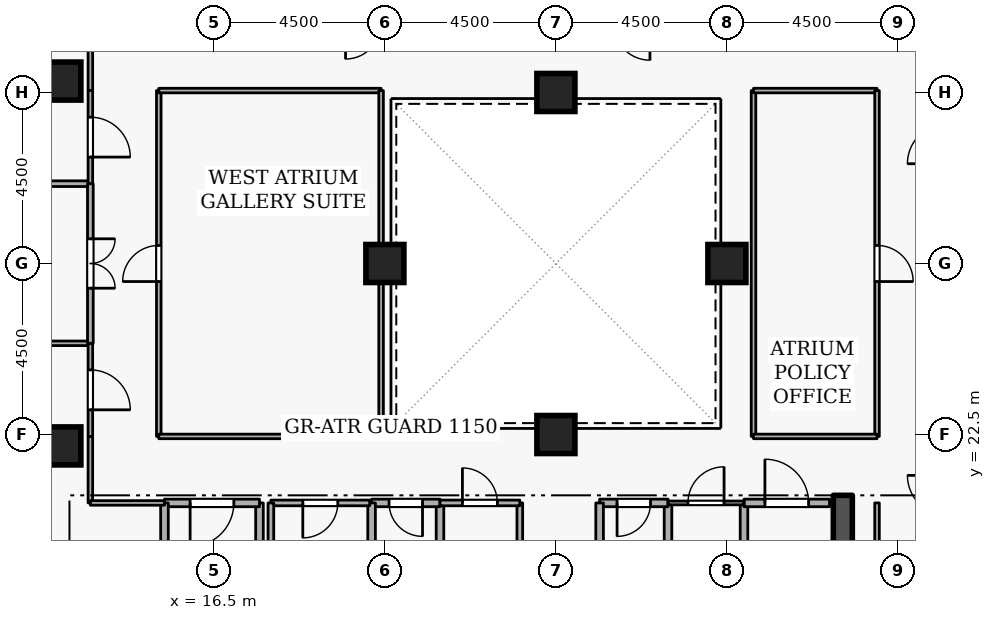
"""IFC4 building model, lengths in metres.
Left out: names, types, materials, properties, quantities, classifications, styles, units other than length and angle.
Written with IfcOpenShell. Run it as: python <this file> out.ifc"""

import sys

from ifc_helpers import new_model, si_unit, direction, frame, frame_2d, origin, origin_2d, place, context, subcontext, project, spatial, rectangle, extrude, element, fill, save


model = new_model("IFC4")
c1 = context("Model", 3, precision=1e-05, world=origin(), true_north=direction((0.0, 1.0)))
c2 = subcontext(c1, "Body", "Model", "MODEL_VIEW")
j1 = project(units=[si_unit("LENGTHUNIT", "METRE"), si_unit("PLANEANGLEUNIT", "RADIAN")], contexts=[c1])
p1 = place(None, origin())
s1 = spatial("IfcSite", under=j1, at=p1, CompositionType="ELEMENT")
p2 = place(p1, origin())
s2 = spatial("IfcBuilding", under=s1, at=p2, CompositionType="ELEMENT")
p3 = place(p2, frame((0.0, 0.0, 236.7)))
s3 = spatial("IfcBuildingStorey", under=s2, at=p3, CompositionType="ELEMENT", Elevation=236.7)
p4 = place(p3, frame((33.05, 15.1, 0.0), z_axis=(0.0, 0.0, 1.0), x_axis=(0.0, 1.0, 0.0)))
e1 = element("IfcWall", 1, at=p4, inside=s3, PredefinedType="SHEAR", context=c2, shape_type="SweptSolid", body=[
    extrude(rectangle(XDim=5.8, YDim=0.5, at=frame_2d((2.9, 0.0))), origin(), (0.0, 0.0, 1.0), 3.6),
])
for number, where, z_axis, x_axis in (
    (2, (12.5, 22.2, 0.0), (0.0, 0.0, 1.0), (1.0, 0.0, 0.0)),
    (3, (12.5, 31.8, 0.0), (0.0, 0.0, 1.0), (1.0, 0.0, 0.0)),
    (4, (25.5, 22.5, 0.0), (0.0, 0.0, 1.0), (1.0, 0.0, 0.0)),
    (5, (25.5, 31.5, 0.0), (0.0, 0.0, 1.0), (1.0, 0.0, 0.0)),
    (6, (21.0, 27.0, 0.0), (0.0, 0.0, 1.0), (1.0, 0.0, 0.0)),
    (7, (30.0, 27.0, 0.0), (0.0, 0.0, 1.0), (1.0, 0.0, 0.0)),
):
    element("IfcColumn", number, at=place(p3, frame(where, z_axis=z_axis, x_axis=x_axis)), inside=s3, PredefinedType="COLUMN", context=c2, shape_type="SweptSolid", body=[
        extrude(rectangle(XDim=1.0, YDim=1.0, at=origin_2d()), origin(), (0.0, 0.0, 1.0), 3.6),
    ])
p5 = place(p3, frame((17.7, 18.4, 0.0), z_axis=(0.0, 0.0, 1.0), x_axis=(0.0, 1.0, 0.0)))
e8 = element("IfcWall", 8, at=p5, inside=s3, PredefinedType="STANDARD", context=c2, shape_type="SweptSolid", body=[
    extrude(rectangle(XDim=2.3, YDim=0.2, at=frame_2d((1.15, 0.0))), origin(), (0.0, 0.0, 1.0), 2.545),
])
p6 = place(p3, frame((17.7, 20.7, 0.0), z_axis=(0.0, 0.0, 1.0), x_axis=(-1.0, 0.0, 0.0)))
e9 = element("IfcWall", 9, at=p6, inside=s3, PredefinedType="STANDARD", context=c2, shape_type="SweptSolid", body=[
    extrude(rectangle(XDim=2.5, YDim=0.2, at=frame_2d((1.25, 0.0))), origin(), (0.0, 0.0, 1.0), 3.34),
])
p7 = place(p6, frame((0.675, 0.0, 0.0)))
e10 = element("IfcOpeningElement", 10, at=p7, cuts=e9, PredefinedType="OPENING", context=c2, shape_type="SweptSolid", body=[
    extrude(rectangle(XDim=1.15, YDim=2.1, at=frame_2d((0.575, 1.05))), frame((0.0, 0.11, 0.0), z_axis=(0.0, -1.0, 0.0), x_axis=(1.0, 0.0, 0.0)), (0.0, 0.0, 1.0), 0.22),
])
p8 = place(p3, frame((15.2, 20.7, 0.0), z_axis=(0.0, 0.0, 1.0), x_axis=(0.0, -1.0, 0.0)))
e11 = element("IfcWall", 11, at=p8, inside=s3, PredefinedType="STANDARD", context=c2, shape_type="SweptSolid", body=[
    extrude(rectangle(XDim=5.7, YDim=0.2, at=frame_2d((2.85, 0.0))), origin(), (0.0, 0.0, 1.0), 3.34),
])
p9 = place(p3, frame((28.45, 18.65, 0.0), z_axis=(0.0, 0.0, 1.0), x_axis=(0.0, 1.0, 0.0)))
e12 = element("IfcWall", 12, at=p9, inside=s3, PredefinedType="STANDARD", context=c2, shape_type="SweptSolid", body=[
    extrude(rectangle(XDim=2.05, YDim=0.2, at=frame_2d((1.025, 0.0))), origin(), (0.0, 0.0, 1.0), 3.34),
])
p10 = place(p3, frame((28.45, 20.7, 0.0), z_axis=(0.0, 0.0, 1.0), x_axis=(-1.0, 0.0, 0.0)))
e13 = element("IfcWall", 13, at=p10, inside=s3, PredefinedType="STANDARD", context=c2, shape_type="SweptSolid", body=[
    extrude(rectangle(XDim=1.8, YDim=0.2, at=frame_2d((0.9, 0.0))), origin(), (0.0, 0.0, 1.0), 3.34),
])
p11 = place(p10, frame((0.46, 0.0, 0.0)))
e14 = element("IfcOpeningElement", 14, at=p11, cuts=e13, PredefinedType="OPENING", context=c2, shape_type="SweptSolid", body=[
    extrude(rectangle(XDim=0.88, YDim=2.04, at=frame_2d((0.44, 1.02))), frame((0.0, 0.11, 0.0), z_axis=(0.0, -1.0, 0.0), x_axis=(1.0, 0.0, 0.0)), (0.0, 0.0, 1.0), 0.22),
])
for number, where, z_axis, x_axis in (
    (15, (26.65, 20.7, 0.0), (0.0, 0.0, 1.0), (0.0, -1.0, 0.0)),
    (16, (22.45, 18.65, 0.0), (0.0, 0.0, 1.0), (0.0, 1.0, 0.0)),
):
    element("IfcWall", number, at=place(p3, frame(where, z_axis=z_axis, x_axis=x_axis)), inside=s3, PredefinedType="STANDARD", context=c2, shape_type="SweptSolid", body=[
        extrude(rectangle(XDim=2.05, YDim=0.2, at=frame_2d((1.025, 0.0))), origin(), (0.0, 0.0, 1.0), 3.34),
    ])
p12 = place(p3, frame((22.45, 20.7, 0.0), z_axis=(0.0, 0.0, 1.0), x_axis=(-1.0, 0.0, 0.0)))
e17 = element("IfcWall", 17, at=p12, inside=s3, PredefinedType="STANDARD", context=c2, shape_type="SweptSolid", body=[
    extrude(rectangle(XDim=1.8, YDim=0.2, at=frame_2d((0.9, 0.0))), origin(), (0.0, 0.0, 1.0), 3.34),
])
p13 = place(p12, frame((0.46, 0.0, 0.0)))
e18 = element("IfcOpeningElement", 18, at=p13, cuts=e17, PredefinedType="OPENING", context=c2, shape_type="SweptSolid", body=[
    extrude(rectangle(XDim=0.88, YDim=2.04, at=frame_2d((0.44, 1.02))), frame((0.0, 0.11, 0.0), z_axis=(0.0, -1.0, 0.0), x_axis=(1.0, 0.0, 0.0)), (0.0, 0.0, 1.0), 0.22),
])
for number, where, z_axis, x_axis in (
    (19, (20.65, 20.7, 0.0), (0.0, 0.0, 1.0), (0.0, -1.0, 0.0)),
    (20, (30.45, 18.65, 0.0), (0.0, 0.0, 1.0), (0.0, 1.0, 0.0)),
):
    element("IfcWall", number, at=place(p3, frame(where, z_axis=z_axis, x_axis=x_axis)), inside=s3, PredefinedType="STANDARD", context=c2, shape_type="SweptSolid", body=[
        extrude(rectangle(XDim=2.05, YDim=0.2, at=frame_2d((1.025, 0.0))), origin(), (0.0, 0.0, 1.0), 3.34),
    ])
p14 = place(p3, frame((30.45, 20.7, 0.0), z_axis=(0.0, 0.0, 1.0), x_axis=(1.0, 0.0, 0.0)))
e21 = element("IfcWall", 21, at=p14, inside=s3, PredefinedType="STANDARD", context=c2, shape_type="SweptSolid", body=[
    extrude(rectangle(XDim=2.25, YDim=0.2, at=frame_2d((1.125, 0.0))), origin(), (0.0, 0.0, 1.0), 3.34),
])
p15 = place(p14, frame((0.55, 0.0, 0.0)))
e22 = element("IfcOpeningElement", 22, at=p15, cuts=e21, PredefinedType="OPENING", context=c2, shape_type="SweptSolid", body=[
    extrude(rectangle(XDim=1.15, YDim=2.1, at=frame_2d((0.575, 1.05))), frame((0.0, 0.11, 0.0), z_axis=(0.0, -1.0, 0.0), x_axis=(1.0, 0.0, 0.0)), (0.0, 0.0, 1.0), 0.22),
])
p16 = place(p3, frame((20.6, 20.7, 0.0), z_axis=(0.0, 0.0, 1.0), x_axis=(-1.0, 0.0, 0.0)))
e23 = element("IfcWall", 23, at=p16, inside=s3, PredefinedType="PARTITIONING", context=c2, shape_type="SweptSolid", body=[
    extrude(rectangle(XDim=2.6, YDim=0.15, at=frame_2d((1.3, 0.0))), origin(), (0.0, 0.0, 1.0), 3.34),
])
p17 = place(p16, frame((0.84, 0.0, 0.0)))
e24 = element("IfcOpeningElement", 24, at=p17, cuts=e23, PredefinedType="OPENING", context=c2, shape_type="SweptSolid", body=[
    extrude(rectangle(XDim=0.92, YDim=2.08, at=frame_2d((0.46, 1.04))), frame((0.0, 0.085, 0.0), z_axis=(0.0, -1.0, 0.0), x_axis=(1.0, 0.0, 0.0)), (0.0, 0.0, 1.0), 0.17),
])
p18 = place(p3, frame((18.0, 20.7, 0.0), z_axis=(0.0, 0.0, 1.0), x_axis=(0.0, -1.0, 0.0)))
e25 = element("IfcWall", 25, at=p18, inside=s3, PredefinedType="PARTITIONING", context=c2, shape_type="SweptSolid", body=[
    extrude(rectangle(XDim=2.05, YDim=0.15, at=frame_2d((1.025, 0.0))), origin(), (0.0, 0.0, 1.0), 2.545),
])
p19 = place(p3, frame((24.55, 20.7, 0.0), z_axis=(0.0, 0.0, 1.0), x_axis=(0.0, -1.0, 0.0)))
e26 = element("IfcWall", 26, at=p19, inside=s3, PredefinedType="PARTITIONING", context=c2, shape_type="SweptSolid", body=[
    extrude(rectangle(XDim=2.05, YDim=0.15, at=frame_2d((1.025, 0.0))), origin(), (0.0, 0.0, 1.0), 3.34),
])
p20 = place(p3, frame((22.45, 20.7, 0.0), z_axis=(0.0, 0.0, 1.0), x_axis=(1.0, 0.0, 0.0)))
e27 = element("IfcWall", 27, at=p20, inside=s3, PredefinedType="PARTITIONING", context=c2, shape_type="SweptSolid", body=[
    extrude(rectangle(XDim=2.1, YDim=0.15, at=frame_2d((1.05, 0.0))), origin(), (0.0, 0.0, 1.0), 3.34),
])
p21 = place(p20, frame((0.59, 0.0, 0.0)))
e28 = element("IfcOpeningElement", 28, at=p21, cuts=e27, PredefinedType="OPENING", context=c2, shape_type="SweptSolid", body=[
    extrude(rectangle(XDim=0.92, YDim=2.08, at=frame_2d((0.46, 1.04))), frame((0.0, 0.085, 0.0), z_axis=(0.0, -1.0, 0.0), x_axis=(1.0, 0.0, 0.0)), (0.0, 0.0, 1.0), 0.17),
])
p22 = place(p3, frame((28.45, 20.7, 0.0), z_axis=(0.0, 0.0, 1.0), x_axis=(1.0, 0.0, 0.0)))
e29 = element("IfcWall", 29, at=p22, inside=s3, PredefinedType="PARTITIONING", context=c2, shape_type="SweptSolid", body=[
    extrude(rectangle(XDim=2.0, YDim=0.1, at=frame_2d((1.0, 0.0))), origin(), (0.0, 0.0, 1.0), 3.34),
])
p23 = place(p22, frame((0.525, 0.0, 0.0)))
e30 = element("IfcOpeningElement", 30, at=p23, cuts=e29, PredefinedType="OPENING", context=c2, shape_type="SweptSolid", body=[
    extrude(rectangle(XDim=0.95, YDim=2.1, at=frame_2d((0.475, 1.05))), frame((0.0, 0.06, 0.0), z_axis=(0.0, -1.0, 0.0), x_axis=(1.0, 0.0, 0.0)), (0.0, 0.0, 1.0), 0.12),
])
p24 = place(p3, frame((33.95, 20.7, 0.0), z_axis=(0.0, 0.0, 1.0), x_axis=(0.0, -1.0, 0.0)))
e31 = element("IfcWall", 31, at=p24, inside=s3, PredefinedType="PARTITIONING", context=c2, shape_type="SweptSolid", body=[
    extrude(rectangle(XDim=5.9, YDim=0.12, at=frame_2d((2.95, 0.0))), origin(), (0.0, 0.0, 1.0), 3.34),
])
p25 = place(p3, frame((13.25, 22.45, 0.0), z_axis=(0.0, 0.0, 1.0), x_axis=(0.0, -1.0, 0.0)))
e32 = element("IfcWall", 32, at=p25, inside=s3, PredefinedType="PARTITIONING", context=c2, shape_type="SweptSolid", body=[
    extrude(rectangle(XDim=1.75, YDim=0.12, at=frame_2d((0.875, 0.0))), origin(), (0.0, 0.0, 1.0), 3.34),
])
p26 = place(p3, frame((13.25, 20.7, 0.0), z_axis=(0.0, 0.0, 1.0), x_axis=(1.0, 0.0, 0.0)))
e33 = element("IfcWall", 33, at=p26, inside=s3, PredefinedType="PARTITIONING", context=c2, shape_type="SweptSolid", body=[
    extrude(rectangle(XDim=1.95, YDim=0.12, at=frame_2d((0.975, 0.0))), origin(), (0.0, 0.0, 1.0), 3.34),
])
p27 = place(p3, frame((1.78, 24.9, 0.0), z_axis=(0.0, 0.0, 1.0), x_axis=(1.0, 0.0, 0.0)))
e34 = element("IfcWall", 34, at=p27, inside=s3, PredefinedType="PARTITIONING", context=c2, shape_type="SweptSolid", body=[
    extrude(rectangle(XDim=11.47, YDim=0.12, at=frame_2d((5.735, 0.0))), origin(), (0.0, 0.0, 1.0), 3.34),
])
p28 = place(p3, frame((13.25, 24.9, 0.0), z_axis=(0.0, 0.0, 1.0), x_axis=(0.0, -1.0, 0.0)))
e35 = element("IfcWall", 35, at=p28, inside=s3, PredefinedType="PARTITIONING", context=c2, shape_type="SweptSolid", body=[
    extrude(rectangle(XDim=2.45, YDim=0.12, at=frame_2d((1.225, 0.0))), origin(), (0.0, 0.0, 1.0), 3.34),
])
p29 = place(p28, frame((0.7, 0.0, 0.0)))
e36 = element("IfcOpeningElement", 36, at=p29, cuts=e35, PredefinedType="OPENING", context=c2, shape_type="SweptSolid", body=[
    extrude(rectangle(XDim=1.05, YDim=2.1, at=frame_2d((0.525, 1.05))), frame((0.0, 0.07, 0.0), z_axis=(0.0, -1.0, 0.0), x_axis=(1.0, 0.0, 0.0)), (0.0, 0.0, 1.0), 0.14),
])
p30 = place(p3, frame((1.78, 29.1, 0.0), z_axis=(0.0, 0.0, 1.0), x_axis=(1.0, 0.0, 0.0)))
e37 = element("IfcWall", 37, at=p30, inside=s3, PredefinedType="PARTITIONING", context=c2, shape_type="SweptSolid", body=[
    extrude(rectangle(XDim=11.47, YDim=0.15, at=frame_2d((5.735, 0.0))), origin(), (0.0, 0.0, 1.0), 3.34),
])
p31 = place(p3, frame((13.25, 29.1, 0.0), z_axis=(0.0, 0.0, 1.0), x_axis=(0.0, -1.0, 0.0)))
e38 = element("IfcWall", 38, at=p31, inside=s3, PredefinedType="PARTITIONING", context=c2, shape_type="SweptSolid", body=[
    extrude(rectangle(XDim=4.2, YDim=0.15, at=frame_2d((2.1, 0.0))), origin(), (0.0, 0.0, 1.0), 3.34),
])
p32 = place(p31, frame((1.45, 0.0, 0.0)))
e39 = element("IfcOpeningElement", 39, at=p32, cuts=e38, PredefinedType="OPENING", context=c2, shape_type="SweptSolid", body=[
    extrude(rectangle(XDim=1.3, YDim=2.12, at=frame_2d((0.65, 1.06))), frame((0.0, 0.085, 0.0), z_axis=(0.0, -1.0, 0.0), x_axis=(1.0, 0.0, 0.0)), (0.0, 0.0, 1.0), 0.17),
])
p33 = place(p3, frame((13.25, 33.3, 0.0), z_axis=(0.0, 0.0, 1.0), x_axis=(0.0, -1.0, 0.0)))
e40 = element("IfcWall", 40, at=p33, inside=s3, PredefinedType="PARTITIONING", context=c2, shape_type="SweptSolid", body=[
    extrude(rectangle(XDim=1.75, YDim=0.12, at=frame_2d((0.875, 0.0))), origin(), (0.0, 0.0, 1.0), 3.34),
])
p34 = place(p3, frame((13.25, 31.55, 0.0), z_axis=(0.0, 0.0, 1.0), x_axis=(0.0, -1.0, 0.0)))
e41 = element("IfcWall", 41, at=p34, inside=s3, PredefinedType="PARTITIONING", context=c2, shape_type="SweptSolid", body=[
    extrude(rectangle(XDim=2.45, YDim=0.12, at=frame_2d((1.225, 0.0))), origin(), (0.0, 0.0, 1.0), 3.34),
])
p35 = place(p34, frame((0.7, 0.0, 0.0)))
e42 = element("IfcOpeningElement", 42, at=p35, cuts=e41, PredefinedType="OPENING", context=c2, shape_type="SweptSolid", body=[
    extrude(rectangle(XDim=1.05, YDim=2.1, at=frame_2d((0.525, 1.05))), frame((0.0, 0.07, 0.0), z_axis=(0.0, -1.0, 0.0), x_axis=(1.0, 0.0, 0.0)), (0.0, 0.0, 1.0), 0.14),
])
p36 = place(p3, frame((15.05, 22.45, 0.0), z_axis=(0.0, 0.0, 1.0), x_axis=(0.0, 1.0, 0.0)))
e43 = element("IfcWall", 43, at=p36, inside=s3, PredefinedType="PARTITIONING", context=c2, shape_type="SweptSolid", body=[
    extrude(rectangle(XDim=9.1, YDim=0.12, at=frame_2d((4.55, 0.0))), origin(), (0.0, 0.0, 1.0), 3.34),
])
p37 = place(p36, frame((4.075, 0.0, 0.0)))
e44 = element("IfcOpeningElement", 44, at=p37, cuts=e43, PredefinedType="OPENING", context=c2, shape_type="SweptSolid", body=[
    extrude(rectangle(XDim=0.95, YDim=2.1, at=frame_2d((0.475, 1.05))), frame((0.0, 0.07, 0.0), z_axis=(0.0, -1.0, 0.0), x_axis=(1.0, 0.0, 0.0)), (0.0, 0.0, 1.0), 0.14),
])
p38 = place(p3, frame((15.05, 31.55, 0.0), z_axis=(0.0, 0.0, 1.0), x_axis=(1.0, 0.0, 0.0)))
e45 = element("IfcWall", 45, at=p38, inside=s3, PredefinedType="PARTITIONING", context=c2, shape_type="SweptSolid", body=[
    extrude(rectangle(XDim=5.85, YDim=0.12, at=frame_2d((2.925, 0.0))), origin(), (0.0, 0.0, 1.0), 3.34),
])
p39 = place(p3, frame((20.9, 31.55, 0.0), z_axis=(0.0, 0.0, 1.0), x_axis=(0.0, -1.0, 0.0)))
e46 = element("IfcWall", 46, at=p39, inside=s3, PredefinedType="PARTITIONING", context=c2, shape_type="SweptSolid", body=[
    extrude(rectangle(XDim=9.1, YDim=0.12, at=frame_2d((4.55, 0.0))), origin(), (0.0, 0.0, 1.0), 3.34),
])
p40 = place(p3, frame((20.9, 22.45, 0.0), z_axis=(0.0, 0.0, 1.0), x_axis=(-1.0, 0.0, 0.0)))
e47 = element("IfcWall", 47, at=p40, inside=s3, PredefinedType="PARTITIONING", context=c2, shape_type="SweptSolid", body=[
    extrude(rectangle(XDim=5.85, YDim=0.12, at=frame_2d((2.925, 0.0))), origin(), (0.0, 0.0, 1.0), 3.34),
])
p41 = place(p3, frame((30.7, 22.45, 0.0), z_axis=(0.0, 0.0, 1.0), x_axis=(0.0, 1.0, 0.0)))
e48 = element("IfcWall", 48, at=p41, inside=s3, PredefinedType="PARTITIONING", context=c2, shape_type="SweptSolid", body=[
    extrude(rectangle(XDim=9.1, YDim=0.12, at=frame_2d((4.55, 0.0))), origin(), (0.0, 0.0, 1.0), 3.34),
])
p42 = place(p3, frame((30.7, 31.55, 0.0), z_axis=(0.0, 0.0, 1.0), x_axis=(1.0, 0.0, 0.0)))
e49 = element("IfcWall", 49, at=p42, inside=s3, PredefinedType="PARTITIONING", context=c2, shape_type="SweptSolid", body=[
    extrude(rectangle(XDim=3.25, YDim=0.12, at=frame_2d((1.625, 0.0))), origin(), (0.0, 0.0, 1.0), 3.34),
])
p43 = place(p3, frame((33.95, 31.55, 0.0), z_axis=(0.0, 0.0, 1.0), x_axis=(0.0, -1.0, 0.0)))
e50 = element("IfcWall", 50, at=p43, inside=s3, PredefinedType="PARTITIONING", context=c2, shape_type="SweptSolid", body=[
    extrude(rectangle(XDim=9.1, YDim=0.12, at=frame_2d((4.55, 0.0))), origin(), (0.0, 0.0, 1.0), 3.34),
])
p44 = place(p43, frame((4.075, 0.0, 0.0)))
e51 = element("IfcOpeningElement", 51, at=p44, cuts=e50, PredefinedType="OPENING", context=c2, shape_type="SweptSolid", body=[
    extrude(rectangle(XDim=0.95, YDim=2.1, at=frame_2d((0.475, 1.05))), frame((0.0, 0.07, 0.0), z_axis=(0.0, -1.0, 0.0), x_axis=(1.0, 0.0, 0.0)), (0.0, 0.0, 1.0), 0.14),
])
p45 = place(p3, frame((33.95, 22.45, 0.0), z_axis=(0.0, 0.0, 1.0), x_axis=(-1.0, 0.0, 0.0)))
e52 = element("IfcWall", 52, at=p45, inside=s3, PredefinedType="PARTITIONING", context=c2, shape_type="SweptSolid", body=[
    extrude(rectangle(XDim=3.25, YDim=0.12, at=frame_2d((1.625, 0.0))), origin(), (0.0, 0.0, 1.0), 3.34),
])
p46 = place(p7, origin())
e53 = element("IfcDoor", 53, at=p46, inside=s3, OperationType="SINGLE_SWING_RIGHT", PredefinedType="DOOR", context=c2, shape_type="SweptSolid", body=[
    extrude(rectangle(XDim=1.15, YDim=2.1, at=frame_2d((0.575, 1.05))), frame((0.0, 0.025, 0.0), z_axis=(0.0, -1.0, 0.0), x_axis=(1.0, 0.0, 0.0)), (0.0, 0.0, 1.0), 0.05),
])
fill(e10, e53)
p47 = place(p11, origin())
e54 = element("IfcDoor", 54, at=p47, inside=s3, OperationType="SINGLE_SWING_RIGHT", PredefinedType="DOOR", context=c2, shape_type="SweptSolid", body=[
    extrude(rectangle(XDim=0.88, YDim=2.04, at=frame_2d((0.44, 1.02))), frame((0.0, 0.025, 0.0), z_axis=(0.0, -1.0, 0.0), x_axis=(1.0, 0.0, 0.0)), (0.0, 0.0, 1.0), 0.05),
])
fill(e14, e54)
p48 = place(p13, origin())
e55 = element("IfcDoor", 55, at=p48, inside=s3, OperationType="SINGLE_SWING_LEFT", PredefinedType="DOOR", context=c2, shape_type="SweptSolid", body=[
    extrude(rectangle(XDim=0.88, YDim=2.04, at=frame_2d((0.44, 1.02))), frame((0.0, 0.025, 0.0), z_axis=(0.0, -1.0, 0.0), x_axis=(1.0, 0.0, 0.0)), (0.0, 0.0, 1.0), 0.05),
])
fill(e18, e55)
p49 = place(p17, origin())
e56 = element("IfcDoor", 56, at=p49, inside=s3, OperationType="SINGLE_SWING_RIGHT", PredefinedType="DOOR", context=c2, shape_type="SweptSolid", body=[
    extrude(rectangle(XDim=0.92, YDim=2.08, at=frame_2d((0.46, 1.04))), frame((0.0, 0.025, 0.0), z_axis=(0.0, -1.0, 0.0), x_axis=(1.0, 0.0, 0.0)), (0.0, 0.0, 1.0), 0.05),
])
fill(e24, e56)
p50 = place(p21, origin())
e57 = element("IfcDoor", 57, at=p50, inside=s3, OperationType="SINGLE_SWING_LEFT", PredefinedType="DOOR", context=c2, shape_type="SweptSolid", body=[
    extrude(rectangle(XDim=0.92, YDim=2.08, at=frame_2d((0.46, 1.04))), frame((0.0, 0.025, 0.0), z_axis=(0.0, -1.0, 0.0), x_axis=(1.0, 0.0, 0.0)), (0.0, 0.0, 1.0), 0.05),
])
fill(e28, e57)
p51 = place(p23, origin())
e58 = element("IfcDoor", 58, at=p51, inside=s3, OperationType="SINGLE_SWING_RIGHT", PredefinedType="DOOR", context=c2, shape_type="SweptSolid", body=[
    extrude(rectangle(XDim=0.95, YDim=2.1, at=frame_2d((0.475, 1.05))), frame((0.0, 0.025, 0.0), z_axis=(0.0, -1.0, 0.0), x_axis=(1.0, 0.0, 0.0)), (0.0, 0.0, 1.0), 0.05),
])
fill(e30, e58)
p52 = place(p15, origin())
e59 = element("IfcDoor", 59, at=p52, inside=s3, OperationType="SINGLE_SWING_LEFT", PredefinedType="DOOR", context=c2, shape_type="SweptSolid", body=[
    extrude(rectangle(XDim=1.15, YDim=2.1, at=frame_2d((0.575, 1.05))), frame((0.0, 0.025, 0.0), z_axis=(0.0, -1.0, 0.0), x_axis=(1.0, 0.0, 0.0)), (0.0, 0.0, 1.0), 0.05),
])
fill(e22, e59)
p53 = place(p29, origin())
e60 = element("IfcDoor", 60, at=p53, inside=s3, OperationType="SINGLE_SWING_RIGHT", PredefinedType="DOOR", context=c2, shape_type="SweptSolid", body=[
    extrude(rectangle(XDim=1.05, YDim=2.1, at=frame_2d((0.525, 1.05))), frame((0.0, 0.025, 0.0), z_axis=(0.0, -1.0, 0.0), x_axis=(1.0, 0.0, 0.0)), (0.0, 0.0, 1.0), 0.05),
])
fill(e36, e60)
p54 = place(p32, origin())
e61 = element("IfcDoor", 61, at=p54, inside=s3, OperationType="DOUBLE_DOOR_SINGLE_SWING", PredefinedType="DOOR", context=c2, shape_type="SweptSolid", body=[
    extrude(rectangle(XDim=1.3, YDim=2.12, at=frame_2d((0.65, 1.06))), frame((0.0, 0.025, 0.0), z_axis=(0.0, -1.0, 0.0), x_axis=(1.0, 0.0, 0.0)), (0.0, 0.0, 1.0), 0.05),
])
fill(e39, e61)
p55 = place(p35, origin())
e62 = element("IfcDoor", 62, at=p55, inside=s3, OperationType="SINGLE_SWING_RIGHT", PredefinedType="DOOR", context=c2, shape_type="SweptSolid", body=[
    extrude(rectangle(XDim=1.05, YDim=2.1, at=frame_2d((0.525, 1.05))), frame((0.0, 0.025, 0.0), z_axis=(0.0, -1.0, 0.0), x_axis=(1.0, 0.0, 0.0)), (0.0, 0.0, 1.0), 0.05),
])
fill(e42, e62)
p56 = place(p37, origin())
e63 = element("IfcDoor", 63, at=p56, inside=s3, OperationType="SINGLE_SWING_LEFT", PredefinedType="DOOR", context=c2, shape_type="SweptSolid", body=[
    extrude(rectangle(XDim=0.95, YDim=2.1, at=frame_2d((0.475, 1.05))), frame((0.0, 0.025, 0.0), z_axis=(0.0, -1.0, 0.0), x_axis=(1.0, 0.0, 0.0)), (0.0, 0.0, 1.0), 0.05),
])
fill(e44, e63)
p57 = place(p44, origin())
e64 = element("IfcDoor", 64, at=p57, inside=s3, OperationType="SINGLE_SWING_RIGHT", PredefinedType="DOOR", context=c2, shape_type="SweptSolid", body=[
    extrude(rectangle(XDim=0.95, YDim=2.1, at=frame_2d((0.475, 1.05))), frame((0.0, 0.025, 0.0), z_axis=(0.0, -1.0, 0.0), x_axis=(1.0, 0.0, 0.0)), (0.0, 0.0, 1.0), 0.05),
])
fill(e51, e64)
save(model, sys.argv[1])
